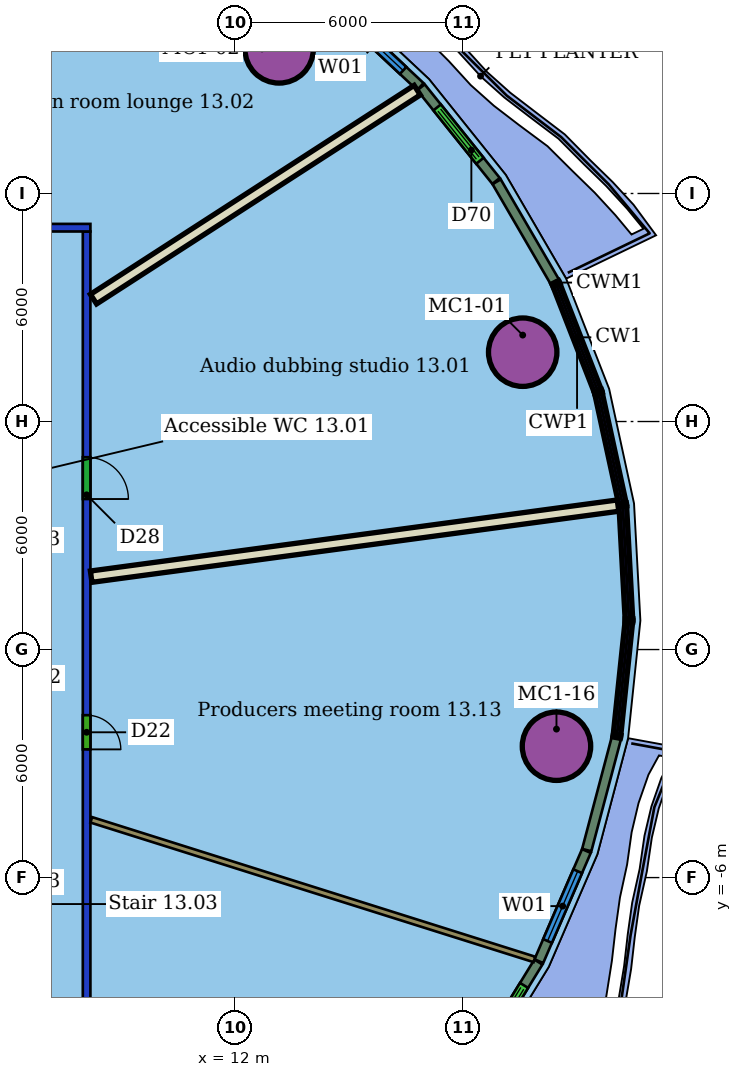
"""IFC4 building model, lengths in metres.
Left out: names, types, materials, properties, quantities, classifications, styles, units other than length and angle.
Written with IfcOpenShell. Run it as: python <this file> out.ifc"""

import sys

from ifc_helpers import new_model, si_unit, direction, frame, frame_2d, origin, origin_2d, place, context, subcontext, project, spatial, rectangle, hollow_circle, extrude, element, fill, save


model = new_model("IFC4")
c1 = context("Model", 3, precision=1e-05, world=origin(), true_north=direction((0.0, 1.0)))
c2 = subcontext(c1, "Body", "Model", "MODEL_VIEW")
j1 = project(units=[si_unit("LENGTHUNIT", "METRE"), si_unit("PLANEANGLEUNIT", "RADIAN")], contexts=[c1])
p1 = place(None, origin())
s1 = spatial("IfcSite", under=j1, at=p1, CompositionType="ELEMENT")
p2 = place(p1, origin())
s2 = spatial("IfcBuilding", under=s1, at=p2, CompositionType="ELEMENT")
p3 = place(p2, frame((0.0, 0.0, 65.6)))
s3 = spatial("IfcBuildingStorey", under=s2, at=p3, CompositionType="ELEMENT", Elevation=65.6)
for number, where, z_axis, x_axis in (
    (1, (19.575, 7.824, 0.0), (0.0, 0.0, 1.0), (1.0, 0.0, 0.0)),
    (2, (13.166, 15.805, 0.0), (0.0, 0.0, 1.0), (1.0, 0.0, 0.0)),
    (3, (20.464, -2.543, 0.0), (0.0, 0.0, 1.0), (1.0, 0.0, 0.0)),
):
    element("IfcColumn", number, at=place(p3, frame(where, z_axis=z_axis, x_axis=x_axis)), inside=s3, PredefinedType="COLUMN", context=c2, shape_type="SweptSolid", body=[
        extrude(hollow_circle(Radius=0.9, WallThickness=0.06, at=origin_2d()), origin(), (0.0, 0.0, 1.0), 3.55),
    ])
p4 = place(p3, frame((-20.2, 11.1, 0.0), z_axis=(0.0, 0.0, 1.0), x_axis=(1.0, 0.0, 0.0)))
e4 = element("IfcWall", 4, at=p4, inside=s3, PredefinedType="PARTITIONING", context=c2, shape_type="SweptSolid", body=[
    extrude(rectangle(XDim=28.4, YDim=0.2, at=frame_2d((14.2, 0.0))), origin(), (0.0, 0.0, 1.0), 2.85),
])
p5 = place(p4, frame((23.828, 0.0, 0.0)))
e5 = element("IfcOpeningElement", 5, at=p5, cuts=e4, PredefinedType="OPENING", context=c2, shape_type="SweptSolid", body=[
    extrude(rectangle(XDim=1.5, YDim=2.1, at=frame_2d((0.75, 1.05))), frame((0.0, 0.11, 0.0), z_axis=(0.0, -1.0, 0.0), x_axis=(1.0, 0.0, 0.0)), (0.0, 0.0, 1.0), 0.22),
])
p6 = place(p4, frame((19.006, 0.0, 0.0)))
e6 = element("IfcOpeningElement", 6, at=p6, cuts=e4, PredefinedType="OPENING", context=c2, shape_type="SweptSolid", body=[
    extrude(rectangle(XDim=1.0, YDim=2.1, at=frame_2d((0.5, 1.05))), frame((0.0, 0.11, 0.0), z_axis=(0.0, -1.0, 0.0), x_axis=(1.0, 0.0, 0.0)), (0.0, 0.0, 1.0), 0.22),
])
p7 = place(p4, frame((10.323, 0.0, 0.0)))
e7 = element("IfcOpeningElement", 7, at=p7, cuts=e4, PredefinedType="OPENING", context=c2, shape_type="SweptSolid", body=[
    extrude(rectangle(XDim=1.2, YDim=2.1, at=frame_2d((0.6, 1.05))), frame((0.0, 0.11, 0.0), z_axis=(0.0, -1.0, 0.0), x_axis=(1.0, 0.0, 0.0)), (0.0, 0.0, 1.0), 0.22),
])
p8 = place(p4, frame((6.36, 0.0, 0.0)))
e8 = element("IfcOpeningElement", 8, at=p8, cuts=e4, PredefinedType="OPENING", context=c2, shape_type="SweptSolid", body=[
    extrude(rectangle(XDim=1.0, YDim=2.1, at=frame_2d((0.5, 1.05))), frame((0.0, 0.11, 0.0), z_axis=(0.0, -1.0, 0.0), x_axis=(1.0, 0.0, 0.0)), (0.0, 0.0, 1.0), 0.22),
])
p9 = place(p3, frame((8.1, 11.0, 0.0), z_axis=(0.0, 0.0, 1.0), x_axis=(0.0, -1.0, 0.0)))
e9 = element("IfcWall", 9, at=p9, inside=s3, PredefinedType="PARTITIONING", context=c2, shape_type="SweptSolid", body=[
    extrude(rectangle(XDim=22.0, YDim=0.2, at=frame_2d((11.0, 0.0))), origin(), (0.0, 0.0, 1.0), 2.85),
])
p10 = place(p9, frame((5.939, 0.0, 0.0)))
e10 = element("IfcOpeningElement", 10, at=p10, cuts=e9, PredefinedType="OPENING", context=c2, shape_type="SweptSolid", body=[
    extrude(rectangle(XDim=1.1, YDim=2.1, at=frame_2d((0.55, 1.05))), frame((0.0, 0.11, 0.0), z_axis=(0.0, -1.0, 0.0), x_axis=(1.0, 0.0, 0.0)), (0.0, 0.0, 1.0), 0.22),
])
p11 = place(p9, frame((12.727, 0.0, 0.0)))
e11 = element("IfcOpeningElement", 11, at=p11, cuts=e9, PredefinedType="OPENING", context=c2, shape_type="SweptSolid", body=[
    extrude(rectangle(XDim=0.9, YDim=2.1, at=frame_2d((0.45, 1.05))), frame((0.0, 0.11, 0.0), z_axis=(0.0, -1.0, 0.0), x_axis=(1.0, 0.0, 0.0)), (0.0, 0.0, 1.0), 0.22),
])
p12 = place(p3, frame((22.084, 3.787, 0.0), z_axis=(0.0, 0.0, 1.0), x_axis=(-0.991028950032, -0.13364737258, 0.0)))
e12 = element("IfcWall", 12, at=p12, inside=s3, PredefinedType="PARTITIONING", context=c2, shape_type="SweptSolid", body=[
    extrude(rectangle(XDim=13.989, YDim=0.3, at=frame_2d((6.995, 0.0))), origin(), (0.0, 0.0, 1.0), 3.55),
])
p13 = place(p3, frame((16.8, 14.719, 0.0), z_axis=(0.0, 0.0, 1.0), x_axis=(-0.840135613628, -0.542376392106, 0.0)))
e13 = element("IfcWall", 13, at=p13, inside=s3, PredefinedType="PARTITIONING", context=c2, shape_type="SweptSolid", body=[
    extrude(rectangle(XDim=10.139, YDim=0.3, at=frame_2d((5.07, 0.0))), origin(), (0.0, 0.0, 1.0), 3.55),
])
p14 = place(p3, frame((8.678, 20.485, 0.0), z_axis=(0.0, 0.0, 1.0), x_axis=(-0.582440193454, -0.812873557849, 0.0)))
e14 = element("IfcWall", 14, at=p14, inside=s3, PredefinedType="PARTITIONING", context=c2, shape_type="SweptSolid", body=[
    extrude(rectangle(XDim=11.368, YDim=0.15, at=frame_2d((5.684, 0.0))), origin(), (0.0, 0.0, 1.0), 3.55),
])
p15 = place(p3, frame((19.884, -8.154, 0.0), z_axis=(0.0, 0.0, 1.0), x_axis=(-0.953792780191, 0.300465193417, 0.0)))
e15 = element("IfcWall", 15, at=p15, inside=s3, PredefinedType="PARTITIONING", context=c2, shape_type="SweptSolid", body=[
    extrude(rectangle(XDim=12.226, YDim=0.15, at=frame_2d((6.113, 0.0))), origin(), (0.0, 0.0, 1.0), 3.55),
])
p16 = place(p3, frame((20.421, 9.676, 0.0), z_axis=(0.0, 0.0, 1.0), x_axis=(-0.502779258101, 0.864414841163, 0.0)))
e16 = element("IfcWall", 16, at=p16, inside=s3, PredefinedType="SOLIDWALL", context=c2, shape_type="SweptSolid", body=[
    extrude(rectangle(XDim=3.046, YDim=0.25, at=frame_2d((1.523, 0.0))), origin(), (0.0, 0.0, 1.0), 3.15),
])
p17 = place(p3, frame((18.874, 12.331, 0.0), z_axis=(0.0, 0.0, 1.0), x_axis=(-0.625543346061, 0.780189414308, 0.0)))
e17 = element("IfcWall", 17, at=p17, inside=s3, PredefinedType="SOLIDWALL", context=c2, shape_type="SweptSolid", body=[
    extrude(rectangle(XDim=3.157, YDim=0.25, at=frame_2d((1.579, 0.0))), origin(), (0.0, 0.0, 1.0), 3.15),
])
p18 = place(p17, frame((0.679, 0.0, 0.0)))
e18 = element("IfcOpeningElement", 18, at=p18, cuts=e17, PredefinedType="OPENING", context=c2, shape_type="SweptSolid", body=[
    extrude(rectangle(XDim=1.8, YDim=2.4, at=frame_2d((0.9, 1.2))), frame((0.0, 0.135, 0.0), z_axis=(0.0, -1.0, 0.0), x_axis=(1.0, 0.0, 0.0)), (0.0, 0.0, 1.0), 0.27),
])
p19 = place(p3, frame((16.882, 14.813, 0.0), z_axis=(0.0, 0.0, 1.0), x_axis=(-0.729856637525, 0.68360024039, 0.0)))
e19 = element("IfcWall", 19, at=p19, inside=s3, PredefinedType="SOLIDWALL", context=c2, shape_type="SweptSolid", body=[
    extrude(rectangle(XDim=3.241, YDim=0.25, at=frame_2d((1.62, 0.0))), origin(), (0.0, 0.0, 1.0), 3.15),
])
p20 = place(p19, frame((0.62, 0.0, 0.8)))
e20 = element("IfcOpeningElement", 20, at=p20, cuts=e19, PredefinedType="OPENING", context=c2, shape_type="SweptSolid", body=[
    extrude(rectangle(XDim=2.0, YDim=2.2, at=frame_2d((1.0, 1.1))), frame((0.0, 0.135, 0.0), z_axis=(0.0, -1.0, 0.0), x_axis=(1.0, 0.0, 0.0)), (0.0, 0.0, 1.0), 0.27),
])
p21 = place(p3, frame((18.294, -10.985, 0.0), z_axis=(0.0, 0.0, 1.0), x_axis=(0.522692781457, 0.852521117752, 0.0)))
e21 = element("IfcWall", 21, at=p21, inside=s3, PredefinedType="SOLIDWALL", context=c2, shape_type="SweptSolid", body=[
    extrude(rectangle(XDim=3.241, YDim=0.25, at=frame_2d((1.62, 0.0))), origin(), (0.0, 0.0, 1.0), 3.15),
])
p22 = place(p21, frame((0.72, 0.0, 0.0)))
e22 = element("IfcOpeningElement", 22, at=p22, cuts=e21, PredefinedType="OPENING", context=c2, shape_type="SweptSolid", body=[
    extrude(rectangle(XDim=1.8, YDim=2.4, at=frame_2d((0.9, 1.2))), frame((0.0, 0.135, 0.0), z_axis=(0.0, -1.0, 0.0), x_axis=(1.0, 0.0, 0.0)), (0.0, 0.0, 1.0), 0.27),
])
p23 = place(p3, frame((20.0, -8.2, 0.0), z_axis=(0.0, 0.0, 1.0), x_axis=(0.396530812493, 0.918021413009, 0.0)))
e23 = element("IfcWall", 23, at=p23, inside=s3, PredefinedType="SOLIDWALL", context=c2, shape_type="SweptSolid", body=[
    extrude(rectangle(XDim=3.157, YDim=0.25, at=frame_2d((1.579, 0.0))), origin(), (0.0, 0.0, 1.0), 3.15),
])
p24 = place(p23, frame((0.579, 0.0, 0.8)))
e24 = element("IfcOpeningElement", 24, at=p24, cuts=e23, PredefinedType="OPENING", context=c2, shape_type="SweptSolid", body=[
    extrude(rectangle(XDim=2.0, YDim=2.2, at=frame_2d((1.0, 1.1))), frame((0.0, 0.135, 0.0), z_axis=(0.0, -1.0, 0.0), x_axis=(1.0, 0.0, 0.0)), (0.0, 0.0, 1.0), 0.27),
])
p25 = place(p3, frame((21.26, -5.276, 0.0), z_axis=(0.0, 0.0, 1.0), x_axis=(0.255826473169, 0.966722719101, 0.0)))
e25 = element("IfcWall", 25, at=p25, inside=s3, PredefinedType="SOLIDWALL", context=c2, shape_type="SweptSolid", body=[
    extrude(rectangle(XDim=3.046, YDim=0.25, at=frame_2d((1.523, 0.0))), origin(), (0.0, 0.0, 1.0), 3.15),
])
p26 = place(p10, origin())
e26 = element("IfcDoor", 26, at=p26, inside=s3, OperationType="SINGLE_SWING_RIGHT", PredefinedType="DOOR", context=c2, shape_type="SweptSolid", body=[
    extrude(rectangle(XDim=1.1, YDim=2.1, at=frame_2d((0.55, 1.05))), frame((0.0, 0.025, 0.0), z_axis=(0.0, -1.0, 0.0), x_axis=(1.0, 0.0, 0.0)), (0.0, 0.0, 1.0), 0.05),
])
fill(e10, e26)
p27 = place(p11, origin())
e27 = element("IfcDoor", 27, at=p27, inside=s3, OperationType="SINGLE_SWING_RIGHT", PredefinedType="DOOR", context=c2, shape_type="SweptSolid", body=[
    extrude(rectangle(XDim=0.9, YDim=2.1, at=frame_2d((0.45, 1.05))), frame((0.0, 0.025, 0.0), z_axis=(0.0, -1.0, 0.0), x_axis=(1.0, 0.0, 0.0)), (0.0, 0.0, 1.0), 0.05),
])
fill(e11, e27)
p28 = place(p18, origin())
e28 = element("IfcDoor", 28, at=p28, inside=s3, OperationType="DOUBLE_DOOR_SLIDING", PredefinedType="DOOR", context=c2, shape_type="SweptSolid", body=[
    extrude(rectangle(XDim=1.8, YDim=2.4, at=frame_2d((0.9, 1.2))), frame((0.0, 0.025, 0.0), z_axis=(0.0, -1.0, 0.0), x_axis=(1.0, 0.0, 0.0)), (0.0, 0.0, 1.0), 0.05),
])
fill(e18, e28)
p29 = place(p20, origin())
e29 = element("IfcWindow", 29, at=p29, inside=s3, PartitioningType="SINGLE_PANEL", PredefinedType="WINDOW", context=c2, shape_type="SweptSolid", body=[
    extrude(rectangle(XDim=2.0, YDim=2.2, at=frame_2d((1.0, 1.1))), frame((0.0, 0.03, 0.0), z_axis=(0.0, -1.0, 0.0), x_axis=(1.0, 0.0, 0.0)), (0.0, 0.0, 1.0), 0.06),
])
fill(e20, e29)
p30 = place(p22, origin())
e30 = element("IfcDoor", 30, at=p30, inside=s3, OperationType="DOUBLE_DOOR_SLIDING", PredefinedType="DOOR", context=c2, shape_type="SweptSolid", body=[
    extrude(rectangle(XDim=1.8, YDim=2.4, at=frame_2d((0.9, 1.2))), frame((0.0, 0.025, 0.0), z_axis=(0.0, -1.0, 0.0), x_axis=(1.0, 0.0, 0.0)), (0.0, 0.0, 1.0), 0.05),
])
fill(e22, e30)
p31 = place(p24, origin())
e31 = element("IfcWindow", 31, at=p31, inside=s3, PartitioningType="SINGLE_PANEL", PredefinedType="WINDOW", context=c2, shape_type="SweptSolid", body=[
    extrude(rectangle(XDim=2.0, YDim=2.2, at=frame_2d((1.0, 1.1))), frame((0.0, 0.03, 0.0), z_axis=(0.0, -1.0, 0.0), x_axis=(1.0, 0.0, 0.0)), (0.0, 0.0, 1.0), 0.06),
])
fill(e24, e31)
save(model, sys.argv[1])
